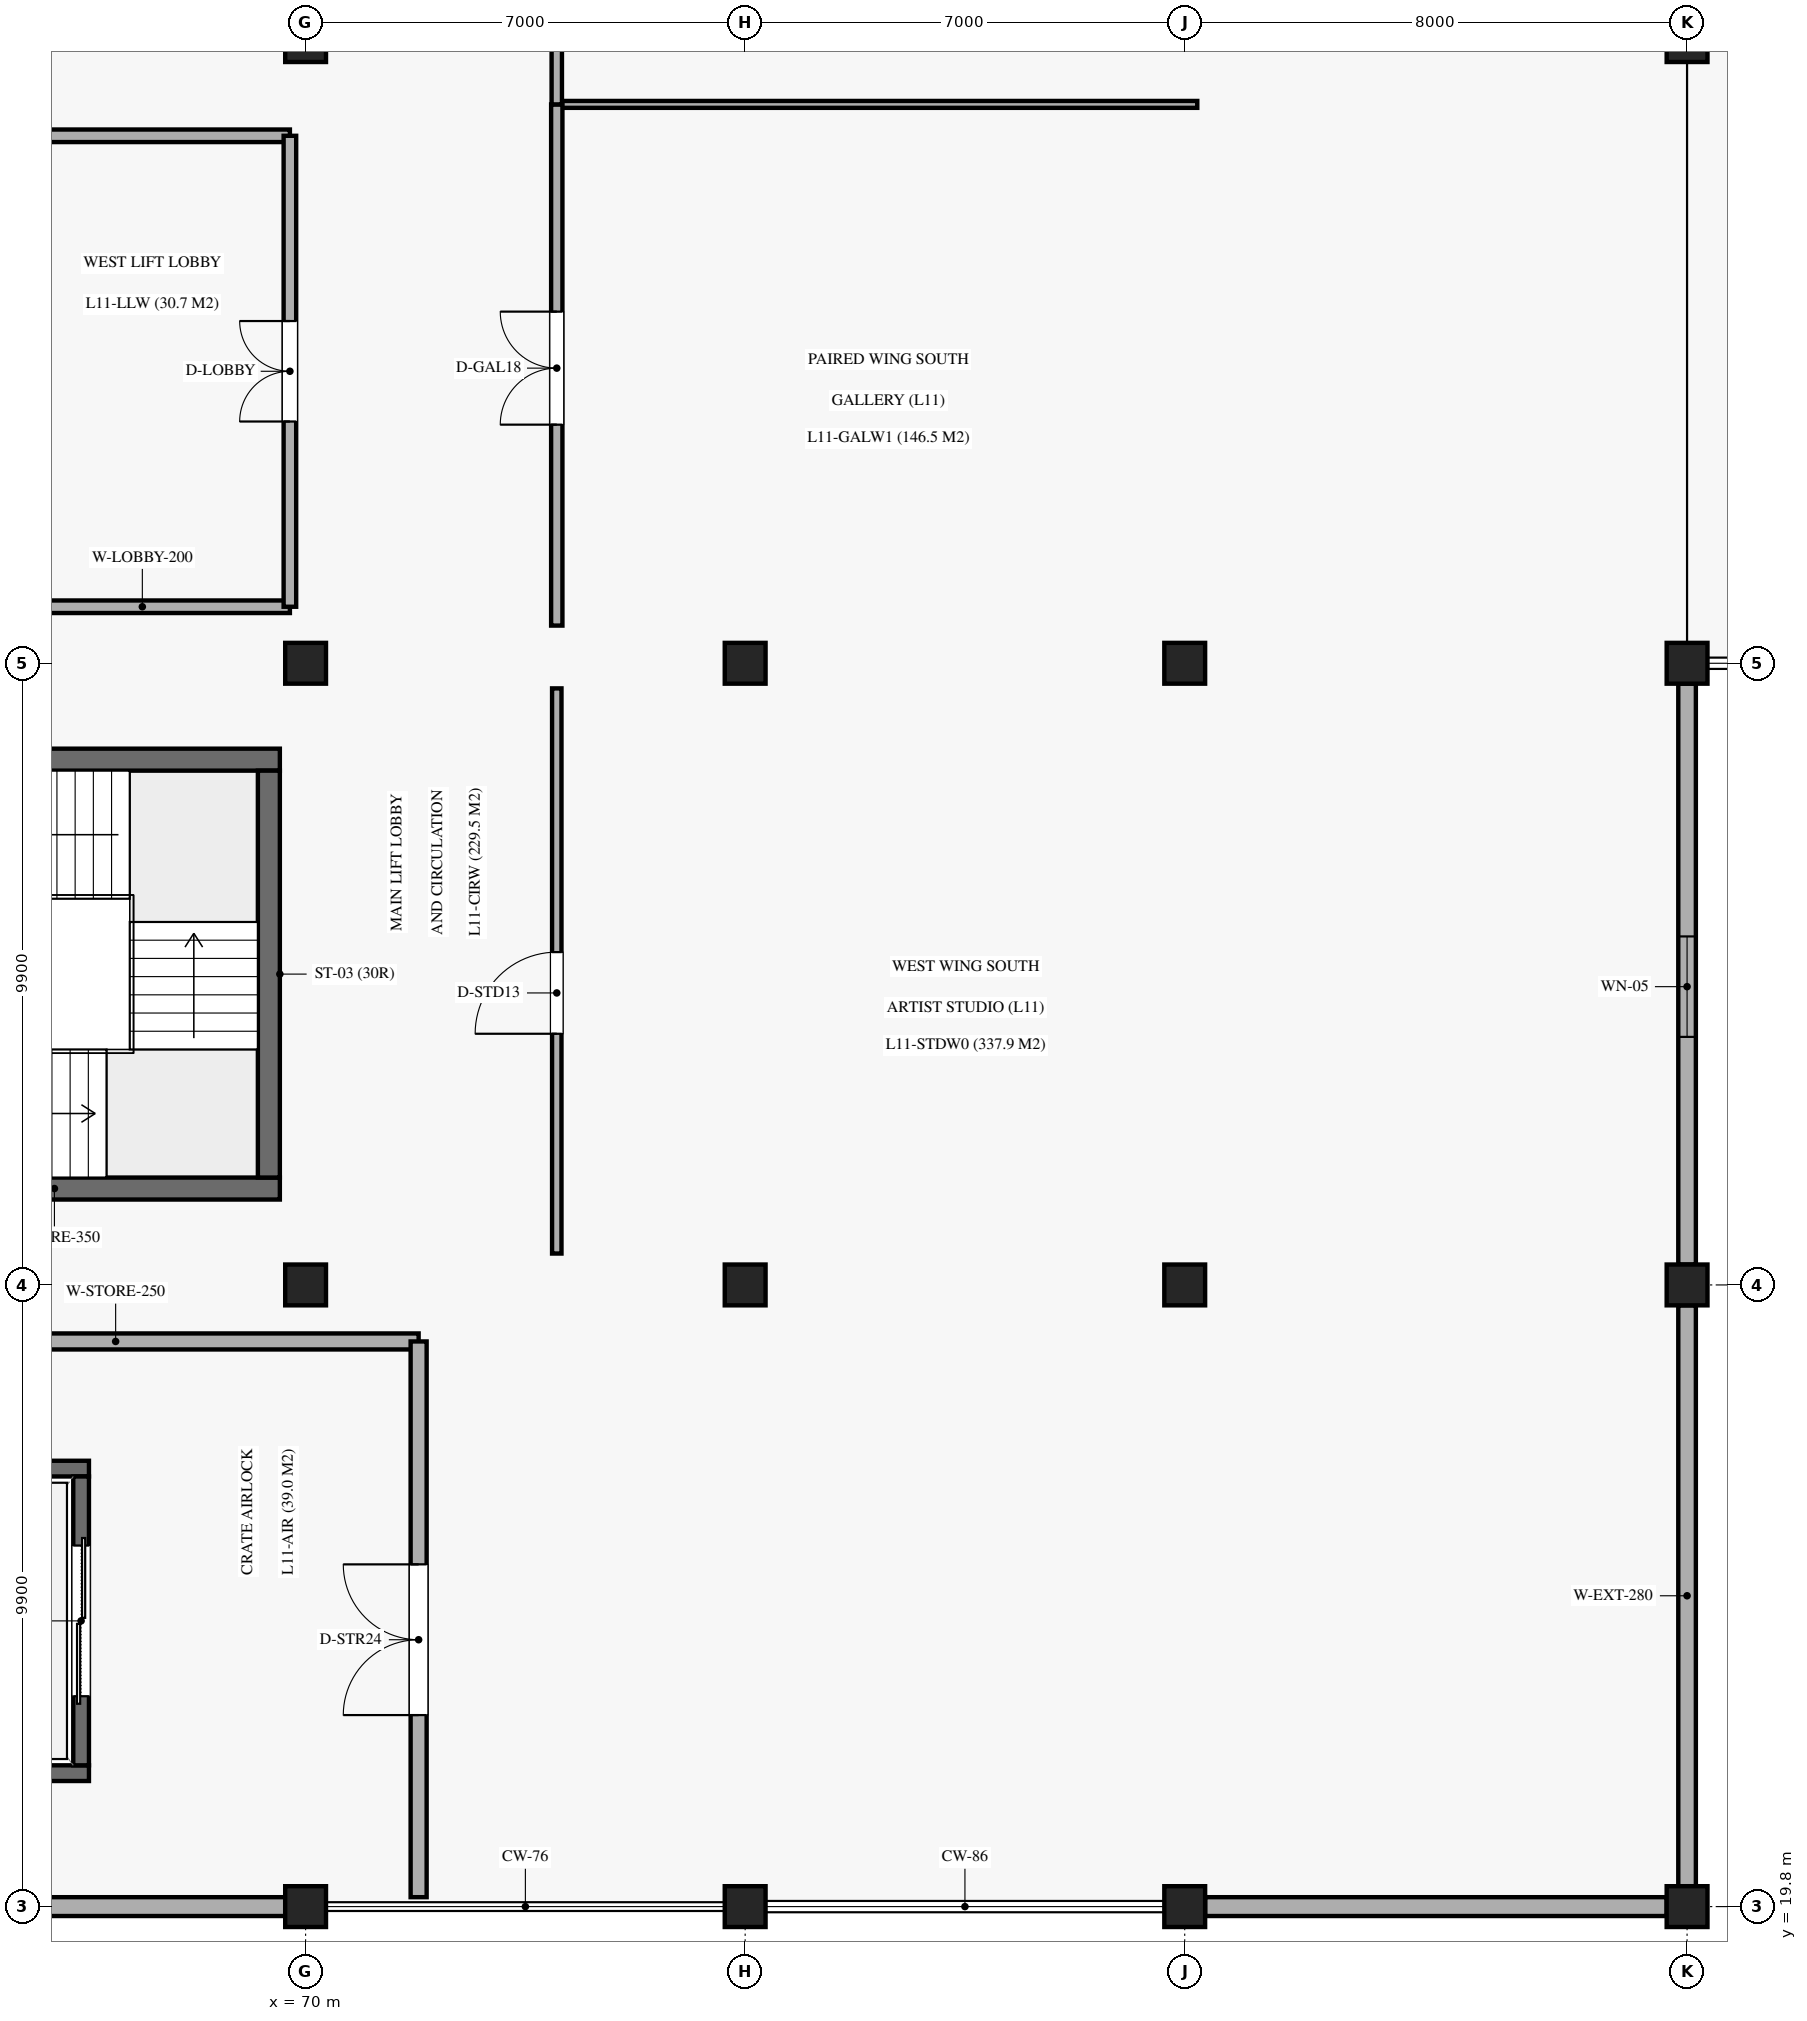
"""IFC4 building model, lengths in metres.
Left out: names, types, materials, properties, quantities, classifications, styles, units other than length and angle.
Written with IfcOpenShell. Run it as: python <this file> out.ifc"""

import sys

from ifc_helpers import new_model, si_unit, direction, frame, frame_2d, origin, origin_2d, place, context, subcontext, project, spatial, rectangle, extrude, element, fill, save


model = new_model("IFC4")
c1 = context("Model", 3, precision=1e-05, world=origin(), true_north=direction((0.0, 1.0)))
c2 = subcontext(c1, "Body", "Model", "MODEL_VIEW")
j1 = project(units=[si_unit("LENGTHUNIT", "METRE"), si_unit("PLANEANGLEUNIT", "RADIAN")], contexts=[c1])
p1 = place(None, origin())
s1 = spatial("IfcSite", under=j1, at=p1, CompositionType="ELEMENT")
p2 = place(p1, origin())
s2 = spatial("IfcBuilding", under=s1, at=p2, CompositionType="ELEMENT")
p3 = place(p2, frame((0.0, 0.0, 57.12)))
s3 = spatial("IfcBuildingStorey", under=s2, at=p3, CompositionType="ELEMENT", Elevation=57.12)
for number, where, z_axis, x_axis in (
    (1, (70.0, 19.8, 0.0), (0.0, 0.0, 1.0), (1.0, 0.0, 0.0)),
    (2, (70.0, 29.7, 0.0), (0.0, 0.0, 1.0), (1.0, 0.0, 0.0)),
    (3, (70.0, 39.6, 0.0), (0.0, 0.0, 1.0), (1.0, 0.0, 0.0)),
    (4, (70.0, 49.5, 0.0), (0.0, 0.0, 1.0), (1.0, 0.0, 0.0)),
    (5, (77.0, 19.8, 0.0), (0.0, 0.0, 1.0), (1.0, 0.0, 0.0)),
    (6, (77.0, 29.7, 0.0), (0.0, 0.0, 1.0), (1.0, 0.0, 0.0)),
    (7, (77.0, 39.6, 0.0), (0.0, 0.0, 1.0), (1.0, 0.0, 0.0)),
    (8, (84.0, 19.8, 0.0), (0.0, 0.0, 1.0), (1.0, 0.0, 0.0)),
    (9, (84.0, 29.7, 0.0), (0.0, 0.0, 1.0), (1.0, 0.0, 0.0)),
    (10, (84.0, 39.6, 0.0), (0.0, 0.0, 1.0), (1.0, 0.0, 0.0)),
    (11, (92.0, 19.8, 0.0), (0.0, 0.0, 1.0), (1.0, 0.0, 0.0)),
    (12, (92.0, 29.7, 0.0), (0.0, 0.0, 1.0), (1.0, 0.0, 0.0)),
    (13, (92.0, 39.6, 0.0), (0.0, 0.0, 1.0), (1.0, 0.0, 0.0)),
    (14, (92.0, 49.5, 0.0), (0.0, 0.0, 1.0), (1.0, 0.0, 0.0)),
):
    element("IfcColumn", number, at=place(p3, frame(where, z_axis=z_axis, x_axis=x_axis)), inside=s3, PredefinedType="COLUMN", context=c2, shape_type="SweptSolid", body=[
        extrude(rectangle(XDim=0.65, YDim=0.65, at=origin_2d()), origin(), (0.0, 0.0, 1.0), 5.1),
    ])
p4 = place(p3, frame((92.0, 20.125, 0.0), z_axis=(0.0, 0.0, 1.0), x_axis=(0.0, 1.0, 0.0)))
e15 = element("IfcWall", 15, at=p4, inside=s3, PredefinedType="SOLIDWALL", context=c2, shape_type="SweptSolid", body=[
    extrude(rectangle(XDim=9.25, YDim=0.28, at=frame_2d((4.625, 0.0))), origin(), (0.0, 0.0, 1.0), 4.12),
])
p5 = place(p3, frame((92.0, 30.025, 0.0), z_axis=(0.0, 0.0, 1.0), x_axis=(0.0, 1.0, 0.0)))
e16 = element("IfcWall", 16, at=p5, inside=s3, PredefinedType="SOLIDWALL", context=c2, shape_type="SweptSolid", body=[
    extrude(rectangle(XDim=9.25, YDim=0.28, at=frame_2d((4.625, 0.0))), origin(), (0.0, 0.0, 1.0), 4.12),
])
p6 = place(p5, frame((3.625, 0.0, 1.45)))
e17 = element("IfcOpeningElement", 17, at=p6, cuts=e16, PredefinedType="OPENING", context=c2, shape_type="SweptSolid", body=[
    extrude(rectangle(XDim=1.6, YDim=1.65, at=frame_2d((0.8, 0.825))), frame((0.0, 0.15, 0.0), z_axis=(0.0, -1.0, 0.0), x_axis=(1.0, 0.0, 0.0)), (0.0, 0.0, 1.0), 0.3),
])
for number, where, z_axis, x_axis in (
    (18, (62.325, 19.8, 0.0), (0.0, 0.0, 1.0), (1.0, 0.0, 0.0)),
    (19, (84.325, 19.8, 0.0), (0.0, 0.0, 1.0), (1.0, 0.0, 0.0)),
):
    element("IfcWall", number, at=place(p3, frame(where, z_axis=z_axis, x_axis=x_axis)), inside=s3, PredefinedType="SOLIDWALL", context=c2, shape_type="SweptSolid", body=[
        extrude(rectangle(XDim=7.35, YDim=0.3, at=frame_2d((3.675, 0.0))), origin(), (0.0, 0.0, 1.0), 4.12),
    ])
p7 = place(p3, frame((62.41, 31.235, 0.0), z_axis=(0.0, 0.0, 1.0), x_axis=(1.0, 0.0, 0.0)))
e20 = element("IfcWall", 20, at=p7, inside=s3, PredefinedType="SHEAR", context=c2, shape_type="SweptSolid", body=[
    extrude(rectangle(XDim=7.18, YDim=0.35, at=frame_2d((3.59, 0.0))), origin(), (0.0, 0.0, 1.0), 4.87),
])
p8 = place(p7, frame((0.77, 0.0, 0.0)))
e21 = element("IfcOpeningElement", 21, at=p8, cuts=e20, PredefinedType="OPENING", context=c2, shape_type="SweptSolid", body=[
    extrude(rectangle(XDim=1.2, YDim=2.2, at=frame_2d((0.6, 1.1))), frame((0.0, 0.185, 0.0), z_axis=(0.0, -1.0, 0.0), x_axis=(1.0, 0.0, 0.0)), (0.0, 0.0, 1.0), 0.37),
])
p9 = place(p3, frame((62.41, 38.065, 0.0), z_axis=(0.0, 0.0, 1.0), x_axis=(1.0, 0.0, 0.0)))
e22 = element("IfcWall", 22, at=p9, inside=s3, PredefinedType="SHEAR", context=c2, shape_type="SweptSolid", body=[
    extrude(rectangle(XDim=7.18, YDim=0.35, at=frame_2d((3.59, 0.0))), origin(), (0.0, 0.0, 1.0), 4.87),
])
p10 = place(p3, frame((69.415, 31.41, 0.0), z_axis=(0.0, 0.0, 1.0), x_axis=(0.0, 1.0, 0.0)))
e23 = element("IfcWall", 23, at=p10, inside=s3, PredefinedType="SHEAR", context=c2, shape_type="SweptSolid", body=[
    extrude(rectangle(XDim=6.48, YDim=0.35, at=frame_2d((3.24, 0.0))), origin(), (0.0, 0.0, 1.0), 4.87),
])
for number, where, z_axis, x_axis in (
    (24, (62.65, 21.925, 0.0), (0.0, 0.0, 1.0), (1.0, 0.0, 0.0)),
    (25, (62.65, 26.775, 0.0), (0.0, 0.0, 1.0), (1.0, 0.0, 0.0)),
):
    element("IfcWall", number, at=place(p3, frame(where, z_axis=z_axis, x_axis=x_axis)), inside=s3, PredefinedType="SOLIDWALL", context=c2, shape_type="SweptSolid", body=[
        extrude(rectangle(XDim=3.9, YDim=0.25, at=frame_2d((1.95, 0.0))), origin(), (0.0, 0.0, 1.0), 4.85),
    ])
p11 = place(p3, frame((66.425, 22.05, 0.0), z_axis=(0.0, 0.0, 1.0), x_axis=(0.0, 1.0, 0.0)))
e26 = element("IfcWall", 26, at=p11, inside=s3, PredefinedType="SOLIDWALL", context=c2, shape_type="SweptSolid", body=[
    extrude(rectangle(XDim=4.6, YDim=0.25, at=frame_2d((2.3, 0.0))), origin(), (0.0, 0.0, 1.0), 4.85),
])
p12 = place(p11, frame((1.1, 0.0, 0.0)))
e27 = element("IfcOpeningElement", 27, at=p12, cuts=e26, PredefinedType="OPENING", context=c2, shape_type="SweptSolid", body=[
    extrude(rectangle(XDim=2.4, YDim=2.65, at=frame_2d((1.2, 1.325))), frame((0.0, 0.135, 0.0), z_axis=(0.0, -1.0, 0.0), x_axis=(1.0, 0.0, 0.0)), (0.0, 0.0, 1.0), 0.27),
])
for number, where, z_axis, x_axis in (
    (28, (65.05, 40.5, 0.0), (0.0, 0.0, 1.0), (1.0, 0.0, 0.0)),
    (29, (65.05, 48.0, 0.0), (0.0, 0.0, 1.0), (1.0, 0.0, 0.0)),
):
    element("IfcWall", number, at=place(p3, frame(where, z_axis=z_axis, x_axis=x_axis)), inside=s3, PredefinedType="SOLIDWALL", context=c2, shape_type="SweptSolid", body=[
        extrude(rectangle(XDim=4.7, YDim=0.2, at=frame_2d((2.35, 0.0))), origin(), (0.0, 0.0, 1.0), 3.99),
    ])
p13 = place(p3, frame((69.75, 40.5, 0.0), z_axis=(0.0, 0.0, 1.0), x_axis=(0.0, 1.0, 0.0)))
e30 = element("IfcWall", 30, at=p13, inside=s3, PredefinedType="SOLIDWALL", context=c2, shape_type="SweptSolid", body=[
    extrude(rectangle(XDim=7.5, YDim=0.2, at=frame_2d((3.75, 0.0))), origin(), (0.0, 0.0, 1.0), 3.99),
])
p14 = place(p13, frame((2.95, 0.0, 0.0)))
e31 = element("IfcOpeningElement", 31, at=p14, cuts=e30, PredefinedType="OPENING", context=c2, shape_type="SweptSolid", body=[
    extrude(rectangle(XDim=1.6, YDim=2.2, at=frame_2d((0.8, 1.1))), frame((0.0, 0.11, 0.0), z_axis=(0.0, -1.0, 0.0), x_axis=(1.0, 0.0, 0.0)), (0.0, 0.0, 1.0), 0.22),
])
p15 = place(p3, frame((62.15, 28.8, 0.0), z_axis=(0.0, 0.0, 1.0), x_axis=(1.0, 0.0, 0.0)))
e32 = element("IfcWall", 32, at=p15, inside=s3, PredefinedType="SOLIDWALL", context=c2, shape_type="SweptSolid", body=[
    extrude(rectangle(XDim=9.65, YDim=0.255, at=frame_2d((4.825, 0.0))), origin(), (0.0, 0.0, 1.0), 3.99),
])
p16 = place(p3, frame((71.8, 19.95, 0.0), z_axis=(0.0, 0.0, 1.0), x_axis=(0.0, 1.0, 0.0)))
e33 = element("IfcWall", 33, at=p16, inside=s3, PredefinedType="SOLIDWALL", context=c2, shape_type="SweptSolid", body=[
    extrude(rectangle(XDim=8.85, YDim=0.255, at=frame_2d((4.425, 0.0))), origin(), (0.0, 0.0, 1.0), 3.99),
])
p17 = place(p16, frame((2.9, 0.0, 0.0)))
e34 = element("IfcOpeningElement", 34, at=p17, cuts=e33, PredefinedType="OPENING", context=c2, shape_type="SweptSolid", body=[
    extrude(rectangle(XDim=2.4, YDim=2.5, at=frame_2d((1.2, 1.25))), frame((0.0, 0.137, 0.0), z_axis=(0.0, -1.0, 0.0), x_axis=(1.0, 0.0, 0.0)), (0.0, 0.0, 1.0), 0.275),
])
p18 = place(p3, frame((74.0, 48.5, 0.0), z_axis=(0.0, 0.0, 1.0), x_axis=(1.0, 0.0, 0.0)))
e35 = element("IfcWall", 35, at=p18, inside=s3, PredefinedType="PARTITIONING", context=c2, shape_type="SweptSolid", body=[
    extrude(rectangle(XDim=10.2, YDim=0.11, at=frame_2d((5.1, 0.0))), origin(), (0.0, 0.0, 1.0), 3.99),
])
p19 = place(p3, frame((74.0, 40.2, 0.0), z_axis=(0.0, 0.0, 1.0), x_axis=(0.0, 1.0, 0.0)))
e36 = element("IfcWall", 36, at=p19, inside=s3, PredefinedType="PARTITIONING", context=c2, shape_type="SweptSolid", body=[
    extrude(rectangle(XDim=8.3, YDim=0.18, at=frame_2d((4.15, 0.0))), origin(), (0.0, 0.0, 1.0), 3.99),
])
p20 = place(p19, frame((3.2, 0.0, 0.0)))
e37 = element("IfcOpeningElement", 37, at=p20, cuts=e36, PredefinedType="OPENING", context=c2, shape_type="SweptSolid", body=[
    extrude(rectangle(XDim=1.8, YDim=2.45, at=frame_2d((0.9, 1.225))), frame((0.0, 0.1, 0.0), z_axis=(0.0, -1.0, 0.0), x_axis=(1.0, 0.0, 0.0)), (0.0, 0.0, 1.0), 0.2),
])
p21 = place(p3, frame((74.0, 48.5, 0.0), z_axis=(0.0, 0.0, 1.0), x_axis=(0.0, 1.0, 0.0)))
e38 = element("IfcWall", 38, at=p21, inside=s3, PredefinedType="PARTITIONING", context=c2, shape_type="SweptSolid", body=[
    extrude(rectangle(XDim=20.3, YDim=0.165, at=frame_2d((10.15, 0.0))), origin(), (0.0, 0.0, 1.0), 3.99),
])
p22 = place(p21, frame((2.5, 0.0, 0.0)))
e39 = element("IfcOpeningElement", 39, at=p22, cuts=e38, PredefinedType="OPENING", context=c2, shape_type="SweptSolid", body=[
    extrude(rectangle(XDim=1.8, YDim=2.45, at=frame_2d((0.9, 1.225))), frame((0.0, 0.093, 0.0), z_axis=(0.0, -1.0, 0.0), x_axis=(1.0, 0.0, 0.0)), (0.0, 0.0, 1.0), 0.185),
])
p23 = place(p3, frame((74.0, 30.2, 0.0), z_axis=(0.0, 0.0, 1.0), x_axis=(0.0, 1.0, 0.0)))
e40 = element("IfcWall", 40, at=p23, inside=s3, PredefinedType="PARTITIONING", context=c2, shape_type="SweptSolid", body=[
    extrude(rectangle(XDim=9.0, YDim=0.15, at=frame_2d((4.5, 0.0))), origin(), (0.0, 0.0, 1.0), 3.99),
])
p24 = place(p23, frame((3.5, 0.0, 0.0)))
e41 = element("IfcOpeningElement", 41, at=p24, cuts=e40, PredefinedType="OPENING", context=c2, shape_type="SweptSolid", body=[
    extrude(rectangle(XDim=1.3, YDim=2.25, at=frame_2d((0.65, 1.125))), frame((0.0, 0.085, 0.0), z_axis=(0.0, -1.0, 0.0), x_axis=(1.0, 0.0, 0.0)), (0.0, 0.0, 1.0), 0.17),
])
p25 = place(p6, origin())
e42 = element("IfcWindow", 42, at=p25, inside=s3, PartitioningType="SINGLE_PANEL", PredefinedType="WINDOW", context=c2, shape_type="SweptSolid", body=[
    extrude(rectangle(XDim=1.6, YDim=1.65, at=frame_2d((0.8, 0.825))), frame((0.0, 0.03, 0.0), z_axis=(0.0, -1.0, 0.0), x_axis=(1.0, 0.0, 0.0)), (0.0, 0.0, 1.0), 0.06),
])
fill(e17, e42)
p26 = place(p12, origin())
e43 = element("IfcDoor", 43, at=p26, inside=s3, OperationType="DOUBLE_DOOR_SLIDING", PredefinedType="DOOR", context=c2, shape_type="SweptSolid", body=[
    extrude(rectangle(XDim=2.4, YDim=2.65, at=frame_2d((1.2, 1.325))), frame((0.0, 0.025, 0.0), z_axis=(0.0, -1.0, 0.0), x_axis=(1.0, 0.0, 0.0)), (0.0, 0.0, 1.0), 0.05),
])
fill(e27, e43)
p27 = place(p14, origin())
e44 = element("IfcDoor", 44, at=p27, inside=s3, OperationType="DOUBLE_DOOR_SINGLE_SWING", PredefinedType="DOOR", context=c2, shape_type="SweptSolid", body=[
    extrude(rectangle(XDim=1.6, YDim=2.2, at=frame_2d((0.8, 1.1))), frame((0.0, 0.025, 0.0), z_axis=(0.0, -1.0, 0.0), x_axis=(1.0, 0.0, 0.0)), (0.0, 0.0, 1.0), 0.05),
])
fill(e31, e44)
p28 = place(p17, origin())
e45 = element("IfcDoor", 45, at=p28, inside=s3, OperationType="DOUBLE_DOOR_SINGLE_SWING", PredefinedType="DOOR", context=c2, shape_type="SweptSolid", body=[
    extrude(rectangle(XDim=2.4, YDim=2.5, at=frame_2d((1.2, 1.25))), frame((0.0, 0.025, 0.0), z_axis=(0.0, -1.0, 0.0), x_axis=(1.0, 0.0, 0.0)), (0.0, 0.0, 1.0), 0.05),
])
fill(e34, e45)
p29 = place(p20, origin())
e46 = element("IfcDoor", 46, at=p29, inside=s3, OperationType="DOUBLE_DOOR_SINGLE_SWING", PredefinedType="DOOR", context=c2, shape_type="SweptSolid", body=[
    extrude(rectangle(XDim=1.8, YDim=2.45, at=frame_2d((0.9, 1.225))), frame((0.0, 0.025, 0.0), z_axis=(0.0, -1.0, 0.0), x_axis=(1.0, 0.0, 0.0)), (0.0, 0.0, 1.0), 0.05),
])
fill(e37, e46)
p30 = place(p24, origin())
e47 = element("IfcDoor", 47, at=p30, inside=s3, OperationType="SINGLE_SWING_LEFT", PredefinedType="DOOR", context=c2, shape_type="SweptSolid", body=[
    extrude(rectangle(XDim=1.3, YDim=2.25, at=frame_2d((0.65, 1.125))), frame((0.0, 0.025, 0.0), z_axis=(0.0, -1.0, 0.0), x_axis=(1.0, 0.0, 0.0)), (0.0, 0.0, 1.0), 0.05),
])
fill(e41, e47)
save(model, sys.argv[1])
